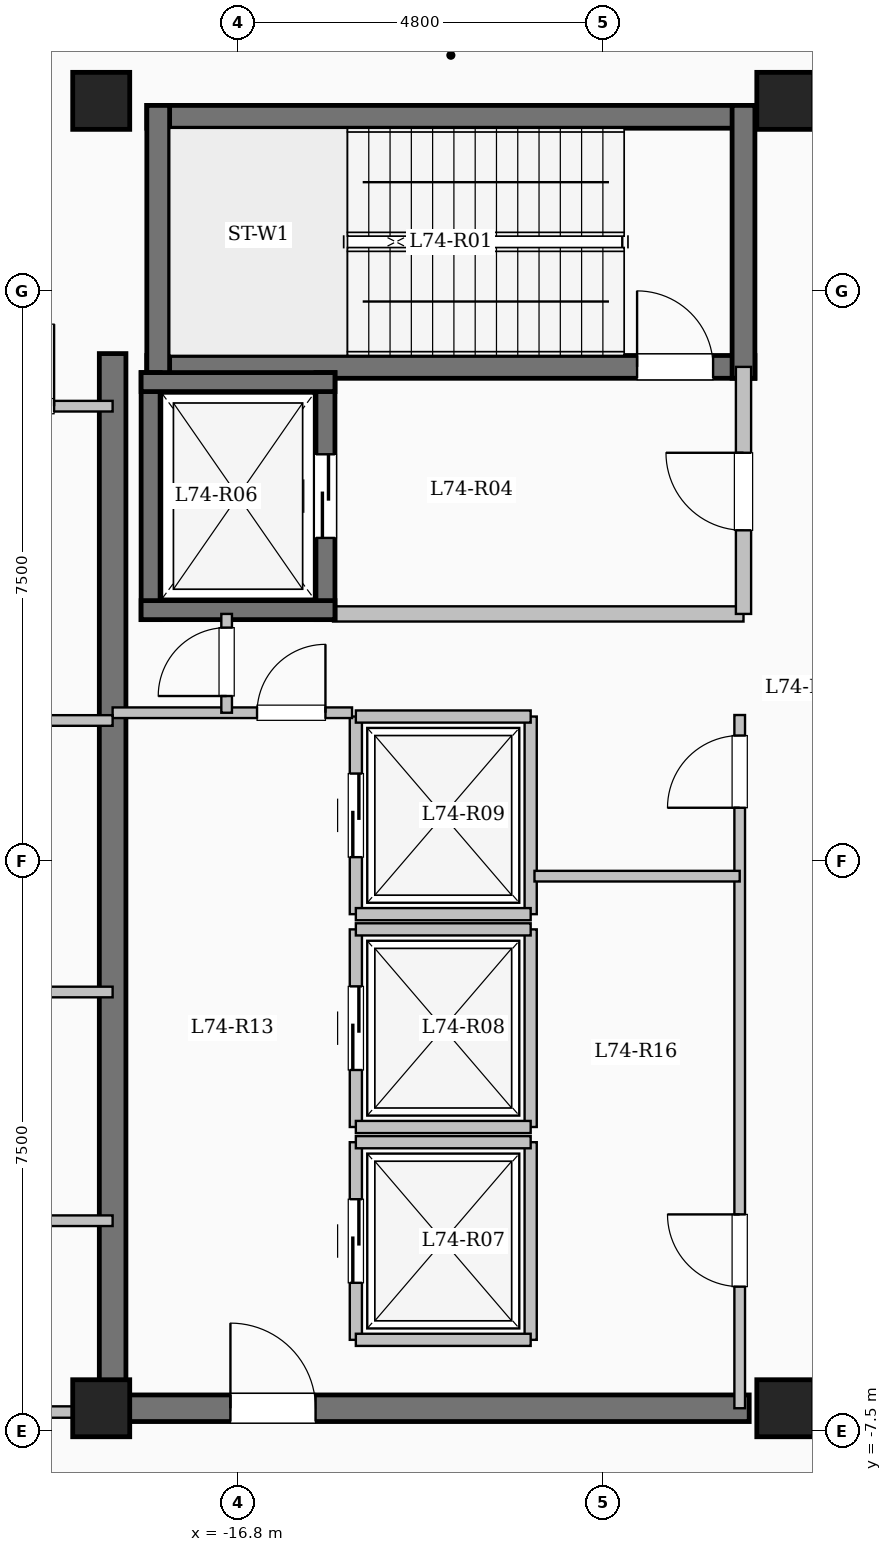
"""IFC4 building model, lengths in metres.
Left out: names, types, materials, properties, quantities, classifications, styles, units other than length and angle.
Written with IfcOpenShell. Run it as: python <this file> out.ifc"""

import sys

from ifc_helpers import new_model, si_unit, direction, frame, frame_2d, origin, origin_2d, place, context, subcontext, project, spatial, rectangle, extrude, element, fill, save


model = new_model("IFC4")
c1 = context("Model", 3, precision=1e-05, world=origin(), true_north=direction((0.0, 1.0)))
c2 = subcontext(c1, "Body", "Model", "MODEL_VIEW")
j1 = project(units=[si_unit("LENGTHUNIT", "METRE"), si_unit("PLANEANGLEUNIT", "RADIAN")], contexts=[c1])
p1 = place(None, origin())
s1 = spatial("IfcSite", under=j1, at=p1, CompositionType="ELEMENT")
p2 = place(p1, origin())
s2 = spatial("IfcBuilding", under=s1, at=p2, CompositionType="ELEMENT")
p3 = place(p2, frame((0.0, 0.0, 271.65)))
s3 = spatial("IfcBuildingStorey", under=s2, at=p3, CompositionType="ELEMENT", Elevation=271.65)
for number, where, z_axis, x_axis in (
    (1, (-9.6, -7.2, 0.0), (0.0, 0.0, 1.0), (1.0, 0.0, 0.0)),
    (2, (-9.6, 10.0, 0.0), (0.0, 0.0, 1.0), (1.0, 0.0, 0.0)),
    (3, (-18.6, -7.2, 0.0), (0.0, 0.0, 1.0), (1.0, 0.0, 0.0)),
    (4, (-18.6, 10.0, 0.0), (0.0, 0.0, 1.0), (1.0, 0.0, 0.0)),
):
    element("IfcColumn", number, at=place(p3, frame(where, z_axis=z_axis, x_axis=x_axis)), inside=s3, PredefinedType="COLUMN", context=c2, shape_type="SweptSolid", body=[
        extrude(rectangle(XDim=0.75, YDim=0.75, at=origin_2d()), origin(), (0.0, 0.0, 1.0), 4.65),
    ])
p4 = place(p3, frame((-18.0, 9.79, 0.0), z_axis=(0.0, 0.0, 1.0), x_axis=(1.0, 0.0, 0.0)))
e5 = element("IfcWall", 5, at=p4, inside=s3, PredefinedType="SHEAR", context=c2, shape_type="SweptSolid", body=[
    extrude(rectangle(XDim=8.0, YDim=0.3, at=frame_2d((4.0, 0.0))), origin(), (0.0, 0.0, 1.0), 4.65),
])
p5 = place(p3, frame((-18.0, 6.5, 0.0), z_axis=(0.0, 0.0, 1.0), x_axis=(1.0, 0.0, 0.0)))
e6 = element("IfcWall", 6, at=p5, inside=s3, PredefinedType="SHEAR", context=c2, shape_type="SweptSolid", body=[
    extrude(rectangle(XDim=8.0, YDim=0.3, at=frame_2d((4.0, 0.0))), origin(), (0.0, 0.0, 1.0), 4.65),
])
p6 = place(p5, frame((6.45, 0.0, 0.0)))
e7 = element("IfcOpeningElement", 7, at=p6, cuts=e6, PredefinedType="OPENING", context=c2, shape_type="SweptSolid", body=[
    extrude(rectangle(XDim=1.0, YDim=2.15, at=frame_2d((0.5, 1.075))), frame((0.0, 0.16, 0.0), z_axis=(0.0, -1.0, 0.0), x_axis=(1.0, 0.0, 0.0)), (0.0, 0.0, 1.0), 0.32),
])
for number, where, z_axis, x_axis in (
    (8, (-17.85, 6.35, 0.0), (0.0, 0.0, 1.0), (0.0, 1.0, 0.0)),
    (9, (-10.15, 6.35, 0.0), (0.0, 0.0, 1.0), (0.0, 1.0, 0.0)),
):
    element("IfcWall", number, at=place(p3, frame(where, z_axis=z_axis, x_axis=x_axis)), inside=s3, PredefinedType="SHEAR", context=c2, shape_type="SweptSolid", body=[
        extrude(rectangle(XDim=3.59, YDim=0.3, at=frame_2d((1.795, 0.0))), origin(), (0.0, 0.0, 1.0), 4.65),
    ])
p7 = place(p3, frame((-15.55, 3.25, 0.0), z_axis=(0.0, 0.0, 1.0), x_axis=(1.0, 0.0, 0.0)))
e10 = element("IfcWall", 10, at=p7, inside=s3, PredefinedType="SOLIDWALL", context=c2, shape_type="SweptSolid", body=[
    extrude(rectangle(XDim=5.4, YDim=0.2, at=frame_2d((2.7, 0.0))), origin(), (0.0, 0.0, 1.0), 4.35),
])
p8 = place(p3, frame((-10.15, 3.25, 0.0), z_axis=(0.0, 0.0, 1.0), x_axis=(0.0, 1.0, 0.0)))
e11 = element("IfcWall", 11, at=p8, inside=s3, PredefinedType="SOLIDWALL", context=c2, shape_type="SweptSolid", body=[
    extrude(rectangle(XDim=3.25, YDim=0.2, at=frame_2d((1.625, 0.0))), origin(), (0.0, 0.0, 1.0), 4.35),
])
p9 = place(p8, frame((1.1, 0.0, 0.0)))
e12 = element("IfcOpeningElement", 12, at=p9, cuts=e11, PredefinedType="OPENING", context=c2, shape_type="SweptSolid", body=[
    extrude(rectangle(XDim=1.02, YDim=2.15, at=frame_2d((0.51, 1.075))), frame((0.0, 0.11, 0.0), z_axis=(0.0, -1.0, 0.0), x_axis=(1.0, 0.0, 0.0)), (0.0, 0.0, 1.0), 0.22),
])
p10 = place(p3, frame((-17.95, 3.175, 0.0), z_axis=(0.0, 0.0, 1.0), x_axis=(0.0, 1.0, 0.0)))
e13 = element("IfcWall", 13, at=p10, inside=s3, PredefinedType="SHEAR", context=c2, shape_type="SweptSolid", body=[
    extrude(rectangle(XDim=3.25, YDim=0.25, at=frame_2d((1.625, 0.0))), origin(), (0.0, 0.0, 1.0), 4.65),
])
p11 = place(p3, frame((-15.65, 3.175, 0.0), z_axis=(0.0, 0.0, 1.0), x_axis=(0.0, 1.0, 0.0)))
e14 = element("IfcWall", 14, at=p11, inside=s3, PredefinedType="SHEAR", context=c2, shape_type="SweptSolid", body=[
    extrude(rectangle(XDim=3.25, YDim=0.25, at=frame_2d((1.625, 0.0))), origin(), (0.0, 0.0, 1.0), 4.65),
])
p12 = place(p11, frame((1.075, 0.0, 0.0)))
e15 = element("IfcOpeningElement", 15, at=p12, cuts=e14, PredefinedType="OPENING", context=c2, shape_type="SweptSolid", body=[
    extrude(rectangle(XDim=1.1, YDim=2.15, at=frame_2d((0.55, 1.075))), frame((0.0, 0.135, 0.0), z_axis=(0.0, -1.0, 0.0), x_axis=(1.0, 0.0, 0.0)), (0.0, 0.0, 1.0), 0.27),
])
for number, where, z_axis, x_axis in (
    (16, (-18.075, 3.3, 0.0), (0.0, 0.0, 1.0), (1.0, 0.0, 0.0)),
    (17, (-18.075, 6.3, 0.0), (0.0, 0.0, 1.0), (1.0, 0.0, 0.0)),
):
    element("IfcWall", number, at=place(p3, frame(where, z_axis=z_axis, x_axis=x_axis)), inside=s3, PredefinedType="SHEAR", context=c2, shape_type="SweptSolid", body=[
        extrude(rectangle(XDim=2.55, YDim=0.25, at=frame_2d((1.275, 0.0))), origin(), (0.0, 0.0, 1.0), 4.65),
    ])
p13 = place(p3, frame((-15.25, -6.3, 0.0), z_axis=(0.0, 0.0, 1.0), x_axis=(0.0, 1.0, 0.0)))
e18 = element("IfcWall", 18, at=p13, inside=s3, PredefinedType="SOLIDWALL", context=c2, shape_type="SweptSolid", body=[
    extrude(rectangle(XDim=2.6, YDim=0.16, at=frame_2d((1.3, 0.0))), origin(), (0.0, 0.0, 1.0), 4.35),
])
p14 = place(p13, frame((0.75, 0.0, 0.0)))
e19 = element("IfcOpeningElement", 19, at=p14, cuts=e18, PredefinedType="OPENING", context=c2, shape_type="SweptSolid", body=[
    extrude(rectangle(XDim=1.1, YDim=2.15, at=frame_2d((0.55, 1.075))), frame((0.0, 0.09, 0.0), z_axis=(0.0, -1.0, 0.0), x_axis=(1.0, 0.0, 0.0)), (0.0, 0.0, 1.0), 0.18),
])
p15 = place(p3, frame((-12.95, -6.3, 0.0), z_axis=(0.0, 0.0, 1.0), x_axis=(0.0, 1.0, 0.0)))
e20 = element("IfcWall", 20, at=p15, inside=s3, PredefinedType="SOLIDWALL", context=c2, shape_type="SweptSolid", body=[
    extrude(rectangle(XDim=2.6, YDim=0.16, at=frame_2d((1.3, 0.0))), origin(), (0.0, 0.0, 1.0), 4.35),
])
for number, where, z_axis, x_axis in (
    (21, (-15.25, -6.3, 0.0), (0.0, 0.0, 1.0), (1.0, 0.0, 0.0)),
    (22, (-15.25, -3.7, 0.0), (0.0, 0.0, 1.0), (1.0, 0.0, 0.0)),
):
    element("IfcWall", number, at=place(p3, frame(where, z_axis=z_axis, x_axis=x_axis)), inside=s3, PredefinedType="SOLIDWALL", context=c2, shape_type="SweptSolid", body=[
        extrude(rectangle(XDim=2.3, YDim=0.16, at=frame_2d((1.15, 0.0))), origin(), (0.0, 0.0, 1.0), 4.35),
    ])
p16 = place(p3, frame((-15.25, -3.5, 0.0), z_axis=(0.0, 0.0, 1.0), x_axis=(0.0, 1.0, 0.0)))
e23 = element("IfcWall", 23, at=p16, inside=s3, PredefinedType="SOLIDWALL", context=c2, shape_type="SweptSolid", body=[
    extrude(rectangle(XDim=2.6, YDim=0.16, at=frame_2d((1.3, 0.0))), origin(), (0.0, 0.0, 1.0), 4.35),
])
p17 = place(p16, frame((0.75, 0.0, 0.0)))
e24 = element("IfcOpeningElement", 24, at=p17, cuts=e23, PredefinedType="OPENING", context=c2, shape_type="SweptSolid", body=[
    extrude(rectangle(XDim=1.1, YDim=2.15, at=frame_2d((0.55, 1.075))), frame((0.0, 0.09, 0.0), z_axis=(0.0, -1.0, 0.0), x_axis=(1.0, 0.0, 0.0)), (0.0, 0.0, 1.0), 0.18),
])
p18 = place(p3, frame((-12.95, -3.5, 0.0), z_axis=(0.0, 0.0, 1.0), x_axis=(0.0, 1.0, 0.0)))
e25 = element("IfcWall", 25, at=p18, inside=s3, PredefinedType="SOLIDWALL", context=c2, shape_type="SweptSolid", body=[
    extrude(rectangle(XDim=2.6, YDim=0.16, at=frame_2d((1.3, 0.0))), origin(), (0.0, 0.0, 1.0), 4.35),
])
for number, where, z_axis, x_axis in (
    (26, (-15.25, -3.5, 0.0), (0.0, 0.0, 1.0), (1.0, 0.0, 0.0)),
    (27, (-15.25, -0.9, 0.0), (0.0, 0.0, 1.0), (1.0, 0.0, 0.0)),
):
    element("IfcWall", number, at=place(p3, frame(where, z_axis=z_axis, x_axis=x_axis)), inside=s3, PredefinedType="SOLIDWALL", context=c2, shape_type="SweptSolid", body=[
        extrude(rectangle(XDim=2.3, YDim=0.16, at=frame_2d((1.15, 0.0))), origin(), (0.0, 0.0, 1.0), 4.35),
    ])
p19 = place(p3, frame((-15.25, -0.7, 0.0), z_axis=(0.0, 0.0, 1.0), x_axis=(0.0, 1.0, 0.0)))
e28 = element("IfcWall", 28, at=p19, inside=s3, PredefinedType="SOLIDWALL", context=c2, shape_type="SweptSolid", body=[
    extrude(rectangle(XDim=2.6, YDim=0.16, at=frame_2d((1.3, 0.0))), origin(), (0.0, 0.0, 1.0), 4.35),
])
p20 = place(p19, frame((0.75, 0.0, 0.0)))
e29 = element("IfcOpeningElement", 29, at=p20, cuts=e28, PredefinedType="OPENING", context=c2, shape_type="SweptSolid", body=[
    extrude(rectangle(XDim=1.1, YDim=2.15, at=frame_2d((0.55, 1.075))), frame((0.0, 0.09, 0.0), z_axis=(0.0, -1.0, 0.0), x_axis=(1.0, 0.0, 0.0)), (0.0, 0.0, 1.0), 0.18),
])
p21 = place(p3, frame((-12.95, -0.7, 0.0), z_axis=(0.0, 0.0, 1.0), x_axis=(0.0, 1.0, 0.0)))
e30 = element("IfcWall", 30, at=p21, inside=s3, PredefinedType="SOLIDWALL", context=c2, shape_type="SweptSolid", body=[
    extrude(rectangle(XDim=2.6, YDim=0.16, at=frame_2d((1.3, 0.0))), origin(), (0.0, 0.0, 1.0), 4.35),
])
for number, where, z_axis, x_axis in (
    (31, (-15.25, -0.7, 0.0), (0.0, 0.0, 1.0), (1.0, 0.0, 0.0)),
    (32, (-15.25, 1.9, 0.0), (0.0, 0.0, 1.0), (1.0, 0.0, 0.0)),
):
    element("IfcWall", number, at=place(p3, frame(where, z_axis=z_axis, x_axis=x_axis)), inside=s3, PredefinedType="SOLIDWALL", context=c2, shape_type="SweptSolid", body=[
        extrude(rectangle(XDim=2.3, YDim=0.16, at=frame_2d((1.15, 0.0))), origin(), (0.0, 0.0, 1.0), 4.35),
    ])
p22 = place(p3, frame((-18.45, -7.375, 0.0), z_axis=(0.0, 0.0, 1.0), x_axis=(0.0, 1.0, 0.0)))
e33 = element("IfcWall", 33, at=p22, inside=s3, PredefinedType="SHEAR", context=c2, shape_type="SweptSolid", body=[
    extrude(rectangle(XDim=14.05, YDim=0.35, at=frame_2d((7.025, 0.0))), origin(), (0.0, 0.0, 1.0), 4.65),
])
p23 = place(p3, frame((-18.625, -7.2, 0.0), z_axis=(0.0, 0.0, 1.0), x_axis=(1.0, 0.0, 0.0)))
e34 = element("IfcWall", 34, at=p23, inside=s3, PredefinedType="SHEAR", context=c2, shape_type="SweptSolid", body=[
    extrude(rectangle(XDim=8.55, YDim=0.35, at=frame_2d((4.275, 0.0))), origin(), (0.0, 0.0, 1.0), 4.65),
])
p24 = place(p23, frame((1.725, 0.0, 0.0)))
e35 = element("IfcOpeningElement", 35, at=p24, cuts=e34, PredefinedType="OPENING", context=c2, shape_type="SweptSolid", body=[
    extrude(rectangle(XDim=1.12, YDim=2.15, at=frame_2d((0.56, 1.075))), frame((0.0, 0.185, 0.0), z_axis=(0.0, -1.0, 0.0), x_axis=(1.0, 0.0, 0.0)), (0.0, 0.0, 1.0), 0.37),
])
p25 = place(p3, frame((-18.45, 1.95, 0.0), z_axis=(0.0, 0.0, 1.0), x_axis=(1.0, 0.0, 0.0)))
e36 = element("IfcWall", 36, at=p25, inside=s3, PredefinedType="PARTITIONING", context=c2, shape_type="SweptSolid", body=[
    extrude(rectangle(XDim=3.15, YDim=0.14, at=frame_2d((1.575, 0.0))), origin(), (0.0, 0.0, 1.0), 4.35),
])
p26 = place(p25, frame((1.9, 0.0, 0.0)))
e37 = element("IfcOpeningElement", 37, at=p26, cuts=e36, PredefinedType="OPENING", context=c2, shape_type="SweptSolid", body=[
    extrude(rectangle(XDim=0.9, YDim=2.08, at=frame_2d((0.45, 1.04))), frame((0.0, 0.08, 0.0), z_axis=(0.0, -1.0, 0.0), x_axis=(1.0, 0.0, 0.0)), (0.0, 0.0, 1.0), 0.16),
])
p27 = place(p3, frame((-16.95, 1.95, 0.0), z_axis=(0.0, 0.0, 1.0), x_axis=(0.0, 1.0, 0.0)))
e38 = element("IfcWall", 38, at=p27, inside=s3, PredefinedType="PARTITIONING", context=c2, shape_type="SweptSolid", body=[
    extrude(rectangle(XDim=1.3, YDim=0.14, at=frame_2d((0.65, 0.0))), origin(), (0.0, 0.0, 1.0), 4.35),
])
p28 = place(p27, frame((0.22, 0.0, 0.0)))
e39 = element("IfcOpeningElement", 39, at=p28, cuts=e38, PredefinedType="OPENING", context=c2, shape_type="SweptSolid", body=[
    extrude(rectangle(XDim=0.9, YDim=2.08, at=frame_2d((0.45, 1.04))), frame((0.0, 0.08, 0.0), z_axis=(0.0, -1.0, 0.0), x_axis=(1.0, 0.0, 0.0)), (0.0, 0.0, 1.0), 0.16),
])
p29 = place(p3, frame((-10.2, -7.2, 0.0), z_axis=(0.0, 0.0, 1.0), x_axis=(0.0, 1.0, 0.0)))
e40 = element("IfcWall", 40, at=p29, inside=s3, PredefinedType="PARTITIONING", context=c2, shape_type="SweptSolid", body=[
    extrude(rectangle(XDim=9.12, YDim=0.14, at=frame_2d((4.56, 0.0))), origin(), (0.0, 0.0, 1.0), 4.35),
])
p30 = place(p29, frame((1.6, 0.0, 0.0)))
e41 = element("IfcOpeningElement", 41, at=p30, cuts=e40, PredefinedType="OPENING", context=c2, shape_type="SweptSolid", body=[
    extrude(rectangle(XDim=0.95, YDim=2.12, at=frame_2d((0.475, 1.06))), frame((0.0, 0.08, 0.0), z_axis=(0.0, -1.0, 0.0), x_axis=(1.0, 0.0, 0.0)), (0.0, 0.0, 1.0), 0.16),
])
p31 = place(p29, frame((7.9, 0.0, 0.0)))
e42 = element("IfcOpeningElement", 42, at=p31, cuts=e40, PredefinedType="OPENING", context=c2, shape_type="SweptSolid", body=[
    extrude(rectangle(XDim=0.95, YDim=2.12, at=frame_2d((0.475, 1.06))), frame((0.0, 0.08, 0.0), z_axis=(0.0, -1.0, 0.0), x_axis=(1.0, 0.0, 0.0)), (0.0, 0.0, 1.0), 0.16),
])
p32 = place(p3, frame((-12.9, -0.2, 0.0), z_axis=(0.0, 0.0, 1.0), x_axis=(1.0, 0.0, 0.0)))
e43 = element("IfcWall", 43, at=p32, inside=s3, PredefinedType="PARTITIONING", context=c2, shape_type="SweptSolid", body=[
    extrude(rectangle(XDim=2.7, YDim=0.14, at=frame_2d((1.35, 0.0))), origin(), (0.0, 0.0, 1.0), 4.35),
])
p33 = place(p3, frame((-22.68, -7.25, 0.0), z_axis=(0.0, 0.0, 1.0), x_axis=(1.0, 0.0, 0.0)))
e44 = element("IfcWall", 44, at=p33, inside=s3, PredefinedType="PARTITIONING", context=c2, shape_type="SweptSolid", body=[
    extrude(rectangle(XDim=4.23, YDim=0.15, at=frame_2d((2.115, 0.0))), origin(), (0.0, 0.0, 1.0), 4.35),
])
p34 = place(p33, frame((1.63, 0.0, 0.0)))
e45 = element("IfcOpeningElement", 45, at=p34, cuts=e44, PredefinedType="OPENING", context=c2, shape_type="SweptSolid", body=[
    extrude(rectangle(XDim=1.08, YDim=2.15, at=frame_2d((0.54, 1.075))), frame((0.0, 0.085, 0.0), z_axis=(0.0, -1.0, 0.0), x_axis=(1.0, 0.0, 0.0)), (0.0, 0.0, 1.0), 0.17),
])
p35 = place(p3, frame((-22.68, -4.733, 0.0), z_axis=(0.0, 0.0, 1.0), x_axis=(1.0, 0.0, 0.0)))
e46 = element("IfcWall", 46, at=p35, inside=s3, PredefinedType="PARTITIONING", context=c2, shape_type="SweptSolid", body=[
    extrude(rectangle(XDim=4.23, YDim=0.14, at=frame_2d((2.115, 0.0))), origin(), (0.0, 0.0, 1.0), 4.35),
])
p36 = place(p35, frame((2.08, 0.0, 0.0)))
e47 = element("IfcOpeningElement", 47, at=p36, cuts=e46, PredefinedType="OPENING", context=c2, shape_type="SweptSolid", body=[
    extrude(rectangle(XDim=1.08, YDim=2.15, at=frame_2d((0.54, 1.075))), frame((0.0, 0.08, 0.0), z_axis=(0.0, -1.0, 0.0), x_axis=(1.0, 0.0, 0.0)), (0.0, 0.0, 1.0), 0.16),
])
p37 = place(p3, frame((-22.68, -1.724, 0.0), z_axis=(0.0, 0.0, 1.0), x_axis=(1.0, 0.0, 0.0)))
e48 = element("IfcWall", 48, at=p37, inside=s3, PredefinedType="PARTITIONING", context=c2, shape_type="SweptSolid", body=[
    extrude(rectangle(XDim=4.23, YDim=0.14, at=frame_2d((2.115, 0.0))), origin(), (0.0, 0.0, 1.0), 4.35),
])
p38 = place(p37, frame((2.08, 0.0, 0.0)))
e49 = element("IfcOpeningElement", 49, at=p38, cuts=e48, PredefinedType="OPENING", context=c2, shape_type="SweptSolid", body=[
    extrude(rectangle(XDim=1.08, YDim=2.15, at=frame_2d((0.54, 1.075))), frame((0.0, 0.08, 0.0), z_axis=(0.0, -1.0, 0.0), x_axis=(1.0, 0.0, 0.0)), (0.0, 0.0, 1.0), 0.16),
])
p39 = place(p3, frame((-22.68, 1.848, 0.0), z_axis=(0.0, 0.0, 1.0), x_axis=(1.0, 0.0, 0.0)))
e50 = element("IfcWall", 50, at=p39, inside=s3, PredefinedType="PARTITIONING", context=c2, shape_type="SweptSolid", body=[
    extrude(rectangle(XDim=4.23, YDim=0.14, at=frame_2d((2.115, 0.0))), origin(), (0.0, 0.0, 1.0), 4.35),
])
p40 = place(p39, frame((2.08, 0.0, 0.0)))
e51 = element("IfcOpeningElement", 51, at=p40, cuts=e50, PredefinedType="OPENING", context=c2, shape_type="SweptSolid", body=[
    extrude(rectangle(XDim=1.08, YDim=2.15, at=frame_2d((0.54, 1.075))), frame((0.0, 0.08, 0.0), z_axis=(0.0, -1.0, 0.0), x_axis=(1.0, 0.0, 0.0)), (0.0, 0.0, 1.0), 0.16),
])
p41 = place(p3, frame((-22.68, 5.983, 0.0), z_axis=(0.0, 0.0, 1.0), x_axis=(1.0, 0.0, 0.0)))
e52 = element("IfcWall", 52, at=p41, inside=s3, PredefinedType="PARTITIONING", context=c2, shape_type="SweptSolid", body=[
    extrude(rectangle(XDim=4.23, YDim=0.14, at=frame_2d((2.115, 0.0))), origin(), (0.0, 0.0, 1.0), 3.935),
])
p42 = place(p41, frame((2.38, 0.0, 0.0)))
e53 = element("IfcOpeningElement", 53, at=p42, cuts=e52, PredefinedType="OPENING", context=c2, shape_type="SweptSolid", body=[
    extrude(rectangle(XDim=1.08, YDim=2.15, at=frame_2d((0.54, 1.075))), frame((0.0, 0.08, 0.0), z_axis=(0.0, -1.0, 0.0), x_axis=(1.0, 0.0, 0.0)), (0.0, 0.0, 1.0), 0.16),
])
p43 = place(p6, origin())
e54 = element("IfcDoor", 54, at=p43, inside=s3, OperationType="SINGLE_SWING_LEFT", PredefinedType="DOOR", context=c2, shape_type="SweptSolid", body=[
    extrude(rectangle(XDim=1.0, YDim=2.15, at=frame_2d((0.5, 1.075))), frame((0.0, 0.025, 0.0), z_axis=(0.0, -1.0, 0.0), x_axis=(1.0, 0.0, 0.0)), (0.0, 0.0, 1.0), 0.05),
])
fill(e7, e54)
p44 = place(p9, origin())
e55 = element("IfcDoor", 55, at=p44, inside=s3, OperationType="SINGLE_SWING_RIGHT", PredefinedType="DOOR", context=c2, shape_type="SweptSolid", body=[
    extrude(rectangle(XDim=1.02, YDim=2.15, at=frame_2d((0.51, 1.075))), frame((0.0, 0.025, 0.0), z_axis=(0.0, -1.0, 0.0), x_axis=(1.0, 0.0, 0.0)), (0.0, 0.0, 1.0), 0.05),
])
fill(e12, e55)
p45 = place(p12, origin())
e56 = element("IfcDoor", 56, at=p45, inside=s3, OperationType="SLIDING_TO_LEFT", PredefinedType="DOOR", context=c2, shape_type="SweptSolid", body=[
    extrude(rectangle(XDim=1.1, YDim=2.15, at=frame_2d((0.55, 1.075))), frame((0.0, 0.025, 0.0), z_axis=(0.0, -1.0, 0.0), x_axis=(1.0, 0.0, 0.0)), (0.0, 0.0, 1.0), 0.05),
])
fill(e15, e56)
p46 = place(p14, origin())
e57 = element("IfcDoor", 57, at=p46, inside=s3, OperationType="SLIDING_TO_LEFT", PredefinedType="DOOR", context=c2, shape_type="SweptSolid", body=[
    extrude(rectangle(XDim=1.1, YDim=2.15, at=frame_2d((0.55, 1.075))), frame((0.0, 0.025, 0.0), z_axis=(0.0, -1.0, 0.0), x_axis=(1.0, 0.0, 0.0)), (0.0, 0.0, 1.0), 0.05),
])
fill(e19, e57)
p47 = place(p17, origin())
e58 = element("IfcDoor", 58, at=p47, inside=s3, OperationType="SLIDING_TO_LEFT", PredefinedType="DOOR", context=c2, shape_type="SweptSolid", body=[
    extrude(rectangle(XDim=1.1, YDim=2.15, at=frame_2d((0.55, 1.075))), frame((0.0, 0.025, 0.0), z_axis=(0.0, -1.0, 0.0), x_axis=(1.0, 0.0, 0.0)), (0.0, 0.0, 1.0), 0.05),
])
fill(e24, e58)
p48 = place(p20, origin())
e59 = element("IfcDoor", 59, at=p48, inside=s3, OperationType="SLIDING_TO_LEFT", PredefinedType="DOOR", context=c2, shape_type="SweptSolid", body=[
    extrude(rectangle(XDim=1.1, YDim=2.15, at=frame_2d((0.55, 1.075))), frame((0.0, 0.025, 0.0), z_axis=(0.0, -1.0, 0.0), x_axis=(1.0, 0.0, 0.0)), (0.0, 0.0, 1.0), 0.05),
])
fill(e29, e59)
p49 = place(p24, origin())
e60 = element("IfcDoor", 60, at=p49, inside=s3, OperationType="SINGLE_SWING_LEFT", PredefinedType="DOOR", context=c2, shape_type="SweptSolid", body=[
    extrude(rectangle(XDim=1.12, YDim=2.15, at=frame_2d((0.56, 1.075))), frame((0.0, 0.025, 0.0), z_axis=(0.0, -1.0, 0.0), x_axis=(1.0, 0.0, 0.0)), (0.0, 0.0, 1.0), 0.05),
])
fill(e35, e60)
p50 = place(p26, origin())
e61 = element("IfcDoor", 61, at=p50, inside=s3, OperationType="SINGLE_SWING_RIGHT", PredefinedType="DOOR", context=c2, shape_type="SweptSolid", body=[
    extrude(rectangle(XDim=0.9, YDim=2.08, at=frame_2d((0.45, 1.04))), frame((0.0, 0.025, 0.0), z_axis=(0.0, -1.0, 0.0), x_axis=(1.0, 0.0, 0.0)), (0.0, 0.0, 1.0), 0.05),
])
fill(e37, e61)
p51 = place(p28, origin())
e62 = element("IfcDoor", 62, at=p51, inside=s3, OperationType="SINGLE_SWING_LEFT", PredefinedType="DOOR", context=c2, shape_type="SweptSolid", body=[
    extrude(rectangle(XDim=0.9, YDim=2.08, at=frame_2d((0.45, 1.04))), frame((0.0, 0.025, 0.0), z_axis=(0.0, -1.0, 0.0), x_axis=(1.0, 0.0, 0.0)), (0.0, 0.0, 1.0), 0.05),
])
fill(e39, e62)
p52 = place(p30, origin())
e63 = element("IfcDoor", 63, at=p52, inside=s3, OperationType="SINGLE_SWING_RIGHT", PredefinedType="DOOR", context=c2, shape_type="SweptSolid", body=[
    extrude(rectangle(XDim=0.95, YDim=2.12, at=frame_2d((0.475, 1.06))), frame((0.0, 0.025, 0.0), z_axis=(0.0, -1.0, 0.0), x_axis=(1.0, 0.0, 0.0)), (0.0, 0.0, 1.0), 0.05),
])
fill(e41, e63)
p53 = place(p31, origin())
e64 = element("IfcDoor", 64, at=p53, inside=s3, OperationType="SINGLE_SWING_LEFT", PredefinedType="DOOR", context=c2, shape_type="SweptSolid", body=[
    extrude(rectangle(XDim=0.95, YDim=2.12, at=frame_2d((0.475, 1.06))), frame((0.0, 0.025, 0.0), z_axis=(0.0, -1.0, 0.0), x_axis=(1.0, 0.0, 0.0)), (0.0, 0.0, 1.0), 0.05),
])
fill(e42, e64)
p54 = place(p42, origin())
e65 = element("IfcDoor", 65, at=p54, inside=s3, OperationType="SINGLE_SWING_RIGHT", PredefinedType="DOOR", context=c2, shape_type="SweptSolid", body=[
    extrude(rectangle(XDim=1.08, YDim=2.15, at=frame_2d((0.54, 1.075))), frame((0.0, 0.025, 0.0), z_axis=(0.0, -1.0, 0.0), x_axis=(1.0, 0.0, 0.0)), (0.0, 0.0, 1.0), 0.05),
])
fill(e53, e65)
save(model, sys.argv[1])
